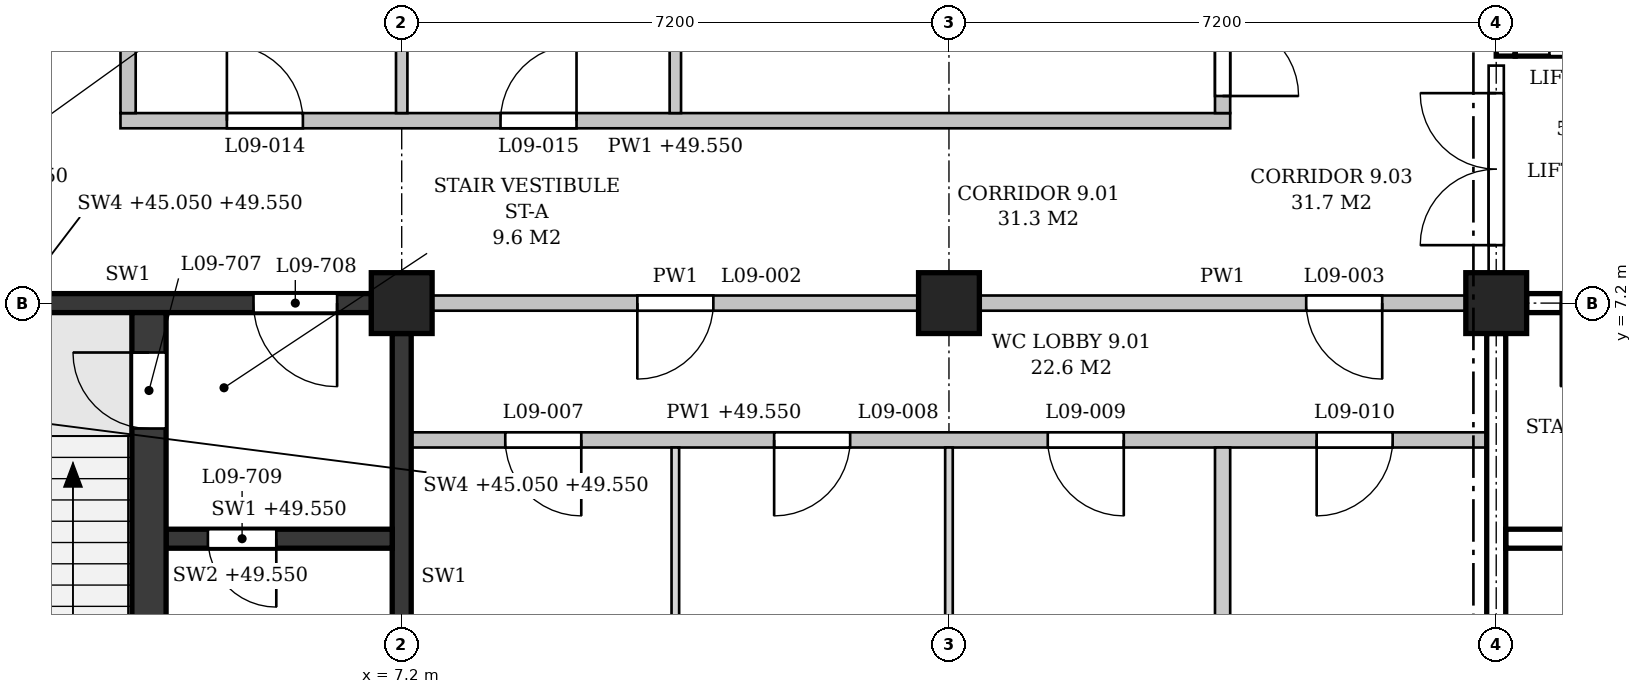
"""IFC4 building model, lengths in metres.
Left out: names, types, materials, properties, quantities, classifications, styles, units other than length and angle.
Written with IfcOpenShell. Run it as: python <this file> out.ifc"""

import sys

from ifc_helpers import new_model, si_unit, direction, frame, frame_2d, origin, origin_2d, place, context, subcontext, project, spatial, polyline, rectangle, outline, extrude, element, fill, save


model = new_model("IFC4")
c1 = context("Model", 3, precision=1e-05, world=origin(), true_north=direction((0.0, 1.0)))
c2 = subcontext(c1, "Body", "Model", "MODEL_VIEW")
j1 = project(units=[si_unit("LENGTHUNIT", "METRE"), si_unit("PLANEANGLEUNIT", "RADIAN")], contexts=[c1])
p1 = place(None, origin())
s1 = spatial("IfcSite", under=j1, at=p1, CompositionType="ELEMENT")
p2 = place(p1, origin())
s2 = spatial("IfcBuilding", under=s1, at=p2, CompositionType="ELEMENT")
p3 = place(p2, frame((0.0, 0.0, 45.3)))
s3 = spatial("IfcBuildingStorey", under=s2, at=p3, CompositionType="ELEMENT", Elevation=45.3)
for number, where, z_axis, x_axis in (
    (1, (7.2, 7.2, 0.0), (0.0, 0.0, 1.0), (1.0, 0.0, 0.0)),
    (2, (14.4, 7.2, 0.0), (0.0, 0.0, 1.0), (1.0, 0.0, 0.0)),
    (3, (21.6, 7.2, 0.0), (0.0, 0.0, 1.0), (1.0, 0.0, 0.0)),
):
    element("IfcColumn", number, at=place(p3, frame(where, z_axis=z_axis, x_axis=x_axis)), inside=s3, PredefinedType="COLUMN", context=c2, shape_type="SweptSolid", body=[
        extrude(rectangle(XDim=0.8, YDim=0.8, at=origin_2d()), origin(), (0.0, 0.0, 1.0), 4.5),
    ])
p4 = place(p3, frame((0.4, 7.2, 0.0), z_axis=(0.0, 0.0, 1.0), x_axis=(1.0, 0.0, 0.0)))
e4 = element("IfcWall", 4, at=p4, inside=s3, PredefinedType="SHEAR", context=c2, shape_type="SweptSolid", body=[
    extrude(rectangle(XDim=6.4, YDim=0.25, at=frame_2d((3.2, 0.0))), origin(), (0.0, 0.0, 1.0), 3.55),
])
p5 = place(p4, frame((4.85, 0.0, 0.0)))
e5 = element("IfcOpeningElement", 5, at=p5, cuts=e4, PredefinedType="OPENING", context=c2, shape_type="SweptSolid", body=[
    extrude(rectangle(XDim=1.1, YDim=2.1, at=frame_2d((0.55, 1.05))), frame((0.0, 0.135, 0.0), z_axis=(0.0, -1.0, 0.0), x_axis=(1.0, 0.0, 0.0)), (0.0, 0.0, 1.0), 0.27),
])
p6 = place(p3, frame((7.2, 0.4, 0.0), z_axis=(0.0, 0.0, 1.0), x_axis=(0.0, 1.0, 0.0)))
e6 = element("IfcWall", 6, at=p6, inside=s3, PredefinedType="SHEAR", context=c2, shape_type="SweptSolid", body=[
    extrude(rectangle(XDim=6.4, YDim=0.25, at=frame_2d((3.2, 0.0))), origin(), (0.0, 0.0, 1.0), 3.55),
])
p7 = place(p3, frame((3.875, 0.15, 0.0), z_axis=(0.0, 0.0, 1.0), x_axis=(0.0, 1.0, 0.0)))
e7 = element("IfcWall", 7, at=p7, inside=s3, PredefinedType="SHEAR", context=c2, shape_type="SweptSolid", body=[
    extrude(rectangle(XDim=6.925, YDim=0.45, at=frame_2d((3.462, 0.0))), origin(), (0.0, 0.0, 1.0), 4.25),
])
p8 = place(p7, frame((5.4, 0.0, 0.0)))
e8 = element("IfcOpeningElement", 8, at=p8, cuts=e7, PredefinedType="OPENING", context=c2, shape_type="SweptSolid", body=[
    extrude(rectangle(XDim=1.0, YDim=2.1, at=frame_2d((0.5, 1.05))), frame((0.0, 0.235, 0.0), z_axis=(0.0, -1.0, 0.0), x_axis=(1.0, 0.0, 0.0)), (0.0, 0.0, 1.0), 0.47),
])
p9 = place(p3, frame((4.1, 4.1, 0.0), z_axis=(0.0, 0.0, 1.0), x_axis=(1.0, 0.0, 0.0)))
e9 = element("IfcWall", 9, at=p9, inside=s3, PredefinedType="SHEAR", context=c2, shape_type="SweptSolid", body=[
    extrude(rectangle(XDim=2.975, YDim=0.25, at=frame_2d((1.487, 0.0))), origin(), (0.0, 0.0, 1.0), 4.25),
])
p10 = place(p9, frame((0.55, 0.0, 0.0)))
e10 = element("IfcOpeningElement", 10, at=p10, cuts=e9, PredefinedType="OPENING", context=c2, shape_type="SweptSolid", body=[
    extrude(rectangle(XDim=0.9, YDim=2.1, at=frame_2d((0.45, 1.05))), frame((0.0, 0.135, 0.0), z_axis=(0.0, -1.0, 0.0), x_axis=(1.0, 0.0, 0.0)), (0.0, 0.0, 1.0), 0.27),
])
p11 = place(p3, frame((22.0, 7.2, 0.0), z_axis=(0.0, 0.0, 1.0), x_axis=(1.0, 0.0, 0.0)))
e11 = element("IfcWall", 11, at=p11, inside=s3, PredefinedType="SHEAR", context=c2, shape_type="SweptSolid", body=[
    extrude(rectangle(XDim=6.4, YDim=0.25, at=frame_2d((3.2, 0.0))), origin(), (0.0, 0.0, 1.0), 3.55),
])
p12 = place(p11, frame((0.45, 0.0, 0.0)))
e12 = element("IfcOpeningElement", 12, at=p12, cuts=e11, PredefinedType="OPENING", context=c2, shape_type="SweptSolid", body=[
    extrude(rectangle(XDim=1.1, YDim=2.1, at=frame_2d((0.55, 1.05))), frame((0.0, 0.135, 0.0), z_axis=(0.0, -1.0, 0.0), x_axis=(1.0, 0.0, 0.0)), (0.0, 0.0, 1.0), 0.27),
])
p13 = place(p3, frame((21.6, 0.4, 0.0), z_axis=(0.0, 0.0, 1.0), x_axis=(0.0, 1.0, 0.0)))
e13 = element("IfcWall", 13, at=p13, inside=s3, PredefinedType="SHEAR", context=c2, shape_type="SweptSolid", body=[
    extrude(rectangle(XDim=6.4, YDim=0.25, at=frame_2d((3.2, 0.0))), origin(), (0.0, 0.0, 1.0), 3.55),
])
p14 = place(p3, frame((21.725, 4.1, 0.0), z_axis=(0.0, 0.0, 1.0), x_axis=(1.0, 0.0, 0.0)))
e14 = element("IfcWall", 14, at=p14, inside=s3, PredefinedType="SHEAR", context=c2, shape_type="SweptSolid", body=[
    extrude(rectangle(XDim=2.975, YDim=0.25, at=frame_2d((1.487, 0.0))), origin(), (0.0, 0.0, 1.0), 4.25),
])
p15 = place(p14, frame((1.525, 0.0, 0.0)))
e15 = element("IfcOpeningElement", 15, at=p15, cuts=e14, PredefinedType="OPENING", context=c2, shape_type="SweptSolid", body=[
    extrude(rectangle(XDim=0.9, YDim=2.1, at=frame_2d((0.45, 1.05))), frame((0.0, 0.135, 0.0), z_axis=(0.0, -1.0, 0.0), x_axis=(1.0, 0.0, 0.0)), (0.0, 0.0, 1.0), 0.27),
])
p16 = place(p3, frame((21.725, 10.45, -0.25), z_axis=(0.0, 0.0, 1.0), x_axis=(0.0, 1.0, 0.0)))
e16 = element("IfcWall", 16, at=p16, inside=s3, PredefinedType="SHEAR", context=c2, shape_type="SweptSolid", body=[
    extrude(rectangle(XDim=3.55, YDim=0.25, at=frame_2d((1.775, 0.0))), origin(), (0.0, 0.0, 1.0), 3.8),
])
p17 = place(p3, frame((21.85, 10.575, -0.25), z_axis=(0.0, 0.0, 1.0), x_axis=(1.0, 0.0, 0.0)))
e17 = element("IfcWall", 17, at=p17, inside=s3, PredefinedType="SHEAR", context=c2, shape_type="SweptSolid", body=[
    extrude(rectangle(XDim=2.0, YDim=0.25, at=frame_2d((1.0, 0.0))), origin(), (0.0, 0.0, 1.0), 4.5),
])
p18 = place(p17, frame((0.45, 0.0, 0.25)))
e18 = element("IfcOpeningElement", 18, at=p18, cuts=e17, PredefinedType="OPENING", context=c2, shape_type="SweptSolid", body=[
    extrude(rectangle(XDim=1.1, YDim=2.1, at=frame_2d((0.55, 1.05))), frame((0.0, 0.135, 0.0), z_axis=(0.0, -1.0, 0.0), x_axis=(1.0, 0.0, 0.0)), (0.0, 0.0, 1.0), 0.27),
])
p19 = place(p3, frame((7.325, 5.4, 0.0), z_axis=(0.0, 0.0, 1.0), x_axis=(1.0, 0.0, 0.0)))
e19 = element("IfcWall", 19, at=p19, inside=s3, PredefinedType="PARTITIONING", context=c2, shape_type="SweptSolid", body=[
    extrude(outline(polyline([(0.0, 0.0), (14.15, 0.0), (14.15, 3.55), (14.05, 3.55), (14.05, 4.25), (7.3, 4.25), (7.3, 3.55), (6.85, 3.55), (6.85, 4.25), (0.1, 4.25), (0.1, 3.55), (0.0, 3.55), (0.0, 0.0)])), frame((0.0, 0.1, 0.0), z_axis=(0.0, -1.0, 0.0), x_axis=(1.0, 0.0, 0.0)), (0.0, 0.0, 1.0), 0.2),
])
p20 = place(p19, frame((1.238, 0.0, 0.0)))
e20 = element("IfcOpeningElement", 20, at=p20, cuts=e19, PredefinedType="OPENING", context=c2, shape_type="SweptSolid", body=[
    extrude(rectangle(XDim=1.0, YDim=2.1, at=frame_2d((0.5, 1.05))), frame((0.0, 0.11, 0.0), z_axis=(0.0, -1.0, 0.0), x_axis=(1.0, 0.0, 0.0)), (0.0, 0.0, 1.0), 0.22),
])
p21 = place(p19, frame((4.775, 0.0, 0.0)))
e21 = element("IfcOpeningElement", 21, at=p21, cuts=e19, PredefinedType="OPENING", context=c2, shape_type="SweptSolid", body=[
    extrude(rectangle(XDim=1.0, YDim=2.1, at=frame_2d((0.5, 1.05))), frame((0.0, 0.11, 0.0), z_axis=(0.0, -1.0, 0.0), x_axis=(1.0, 0.0, 0.0)), (0.0, 0.0, 1.0), 0.22),
])
p22 = place(p19, frame((8.375, 0.0, 0.0)))
e22 = element("IfcOpeningElement", 22, at=p22, cuts=e19, PredefinedType="OPENING", context=c2, shape_type="SweptSolid", body=[
    extrude(rectangle(XDim=1.0, YDim=2.1, at=frame_2d((0.5, 1.05))), frame((0.0, 0.11, 0.0), z_axis=(0.0, -1.0, 0.0), x_axis=(1.0, 0.0, 0.0)), (0.0, 0.0, 1.0), 0.22),
])
p23 = place(p19, frame((11.913, 0.0, 0.0)))
e23 = element("IfcOpeningElement", 23, at=p23, cuts=e19, PredefinedType="OPENING", context=c2, shape_type="SweptSolid", body=[
    extrude(rectangle(XDim=1.0, YDim=2.1, at=frame_2d((0.5, 1.05))), frame((0.0, 0.11, 0.0), z_axis=(0.0, -1.0, 0.0), x_axis=(1.0, 0.0, 0.0)), (0.0, 0.0, 1.0), 0.22),
])
p24 = place(p3, frame((7.6, 7.2, 0.0), z_axis=(0.0, 0.0, 1.0), x_axis=(1.0, 0.0, 0.0)))
e24 = element("IfcWall", 24, at=p24, inside=s3, PredefinedType="PARTITIONING", context=c2, shape_type="SweptSolid", body=[
    extrude(rectangle(XDim=6.4, YDim=0.2, at=frame_2d((3.2, 0.0))), origin(), (0.0, 0.0, 1.0), 3.55),
])
p25 = place(p24, frame((2.7, 0.0, 0.0)))
e25 = element("IfcOpeningElement", 25, at=p25, cuts=e24, PredefinedType="OPENING", context=c2, shape_type="SweptSolid", body=[
    extrude(rectangle(XDim=1.0, YDim=2.1, at=frame_2d((0.5, 1.05))), frame((0.0, 0.11, 0.0), z_axis=(0.0, -1.0, 0.0), x_axis=(1.0, 0.0, 0.0)), (0.0, 0.0, 1.0), 0.22),
])
p26 = place(p3, frame((14.8, 7.2, 0.0), z_axis=(0.0, 0.0, 1.0), x_axis=(1.0, 0.0, 0.0)))
e26 = element("IfcWall", 26, at=p26, inside=s3, PredefinedType="PARTITIONING", context=c2, shape_type="SweptSolid", body=[
    extrude(rectangle(XDim=6.4, YDim=0.2, at=frame_2d((3.2, 0.0))), origin(), (0.0, 0.0, 1.0), 3.55),
])
p27 = place(p26, frame((4.3, 0.0, 0.0)))
e27 = element("IfcOpeningElement", 27, at=p27, cuts=e26, PredefinedType="OPENING", context=c2, shape_type="SweptSolid", body=[
    extrude(rectangle(XDim=1.0, YDim=2.1, at=frame_2d((0.5, 1.05))), frame((0.0, 0.11, 0.0), z_axis=(0.0, -1.0, 0.0), x_axis=(1.0, 0.0, 0.0)), (0.0, 0.0, 1.0), 0.22),
])
p28 = place(p3, frame((3.5, 9.6, 0.0), z_axis=(0.0, 0.0, 1.0), x_axis=(1.0, 0.0, 0.0)))
e28 = element("IfcWall", 28, at=p28, inside=s3, PredefinedType="PARTITIONING", context=c2, shape_type="SweptSolid", body=[
    extrude(outline(polyline([(0.0, 0.0), (14.6, 0.0), (14.6, 4.25), (11.125, 4.25), (11.125, 3.55), (10.675, 3.55), (10.675, 4.25), (3.925, 4.25), (3.925, 3.55), (3.475, 3.55), (3.475, 4.25), (0.0, 4.25), (0.0, 0.0)])), frame((0.0, 0.1, 0.0), z_axis=(0.0, -1.0, 0.0), x_axis=(1.0, 0.0, 0.0)), (0.0, 0.0, 1.0), 0.2),
])
p29 = place(p28, frame((1.4, 0.0, 0.0)))
e29 = element("IfcOpeningElement", 29, at=p29, cuts=e28, PredefinedType="OPENING", context=c2, shape_type="SweptSolid", body=[
    extrude(rectangle(XDim=1.0, YDim=2.1, at=frame_2d((0.5, 1.05))), frame((0.0, 0.11, 0.0), z_axis=(0.0, -1.0, 0.0), x_axis=(1.0, 0.0, 0.0)), (0.0, 0.0, 1.0), 0.22),
])
p30 = place(p28, frame((5.0, 0.0, 0.0)))
e30 = element("IfcOpeningElement", 30, at=p30, cuts=e28, PredefinedType="OPENING", context=c2, shape_type="SweptSolid", body=[
    extrude(rectangle(XDim=1.0, YDim=2.1, at=frame_2d((0.5, 1.05))), frame((0.0, 0.11, 0.0), z_axis=(0.0, -1.0, 0.0), x_axis=(1.0, 0.0, 0.0)), (0.0, 0.0, 1.0), 0.22),
])
p31 = place(p3, frame((3.6, 9.7, 0.0), z_axis=(0.0, 0.0, 1.0), x_axis=(0.0, 1.0, 0.0)))
e31 = element("IfcWall", 31, at=p31, inside=s3, PredefinedType="PARTITIONING", context=c2, shape_type="SweptSolid", body=[
    extrude(rectangle(XDim=1.1, YDim=0.2, at=frame_2d((0.55, 0.0))), origin(), (0.0, 0.0, 1.0), 4.25),
])
p32 = place(p3, frame((7.2, 9.7, 0.0), z_axis=(0.0, 0.0, 1.0), x_axis=(0.0, 1.0, 0.0)))
e32 = element("IfcWall", 32, at=p32, inside=s3, PredefinedType="PARTITIONING", context=c2, shape_type="SweptSolid", body=[
    extrude(rectangle(XDim=4.3, YDim=0.15, at=frame_2d((2.15, 0.0))), origin(), (0.0, 0.0, 1.0), 3.55),
])
p33 = place(p3, frame((10.8, 0.15, 0.0), z_axis=(0.0, 0.0, 1.0), x_axis=(0.0, 1.0, 0.0)))
e33 = element("IfcWall", 33, at=p33, inside=s3, PredefinedType="PARTITIONING", context=c2, shape_type="SweptSolid", body=[
    extrude(rectangle(XDim=5.15, YDim=0.1, at=frame_2d((2.575, 0.0))), origin(), (0.0, 0.0, 1.0), 3.55),
])
p34 = place(p3, frame((10.8, 9.7, 0.0), z_axis=(0.0, 0.0, 1.0), x_axis=(0.0, 1.0, 0.0)))
e34 = element("IfcWall", 34, at=p34, inside=s3, PredefinedType="PARTITIONING", context=c2, shape_type="SweptSolid", body=[
    extrude(rectangle(XDim=11.75, YDim=0.15, at=frame_2d((5.875, 0.0))), origin(), (0.0, 0.0, 1.0), 3.55),
])
p35 = place(p3, frame((14.4, 0.4, 0.0), z_axis=(0.0, 0.0, 1.0), x_axis=(0.0, 1.0, 0.0)))
e35 = element("IfcWall", 35, at=p35, inside=s3, PredefinedType="PARTITIONING", context=c2, shape_type="SweptSolid", body=[
    extrude(rectangle(XDim=4.9, YDim=0.1, at=frame_2d((2.45, 0.0))), origin(), (0.0, 0.0, 1.0), 3.55),
])
p36 = place(p3, frame((18.0, 0.15, 0.0), z_axis=(0.0, 0.0, 1.0), x_axis=(0.0, 1.0, 0.0)))
e36 = element("IfcWall", 36, at=p36, inside=s3, PredefinedType="PARTITIONING", context=c2, shape_type="SweptSolid", body=[
    extrude(outline(polyline([(0.0, 0.0), (5.15, 0.0), (5.15, 4.25), (0.05, 4.25), (0.05, 3.65), (0.0, 3.65), (0.0, 0.0)])), frame((0.0, 0.1, 0.0), z_axis=(0.0, -1.0, 0.0), x_axis=(1.0, 0.0, 0.0)), (0.0, 0.0, 1.0), 0.2),
])
p37 = place(p3, frame((18.0, 9.7, 0.0), z_axis=(0.0, 0.0, 1.0), x_axis=(0.0, 1.0, 0.0)))
e37 = element("IfcWall", 37, at=p37, inside=s3, PredefinedType="PARTITIONING", context=c2, shape_type="SweptSolid", body=[
    extrude(outline(polyline([(0.0, 0.0), (7.1, 0.0), (7.1, 4.25), (4.925, 4.25), (4.925, 3.55), (4.475, 3.55), (4.475, 4.25), (0.0, 4.25), (0.0, 0.0)])), frame((0.0, 0.1, 0.0), z_axis=(0.0, -1.0, 0.0), x_axis=(1.0, 0.0, 0.0)), (0.0, 0.0, 1.0), 0.2),
])
p38 = place(p37, frame((2.55, 0.0, 0.0)))
e38 = element("IfcOpeningElement", 38, at=p38, cuts=e37, PredefinedType="OPENING", context=c2, shape_type="SweptSolid", body=[
    extrude(rectangle(XDim=2.0, YDim=2.1, at=frame_2d((1.0, 1.05))), frame((0.0, 0.11, 0.0), z_axis=(0.0, -1.0, 0.0), x_axis=(1.0, 0.0, 0.0)), (0.0, 0.0, 1.0), 0.22),
])
p39 = place(p37, frame((0.225, 0.0, 0.0)))
e39 = element("IfcOpeningElement", 39, at=p39, cuts=e37, PredefinedType="OPENING", context=c2, shape_type="SweptSolid", body=[
    extrude(rectangle(XDim=2.0, YDim=2.1, at=frame_2d((1.0, 1.05))), frame((0.0, 0.11, 0.0), z_axis=(0.0, -1.0, 0.0), x_axis=(1.0, 0.0, 0.0)), (0.0, 0.0, 1.0), 0.22),
])
p40 = place(p3, frame((21.6, 7.6, 0.0), z_axis=(0.0, 0.0, 1.0), x_axis=(0.0, 1.0, 0.0)))
e40 = element("IfcWall", 40, at=p40, inside=s3, PredefinedType="PARTITIONING", context=c2, shape_type="SweptSolid", body=[
    extrude(rectangle(XDim=2.725, YDim=0.2, at=frame_2d((1.362, 0.0))), origin(), (0.0, 0.0, 1.0), 3.55),
])
p41 = place(p40, frame((0.362, 0.0, 0.0)))
e41 = element("IfcOpeningElement", 41, at=p41, cuts=e40, PredefinedType="OPENING", context=c2, shape_type="SweptSolid", body=[
    extrude(rectangle(XDim=2.0, YDim=2.4, at=frame_2d((1.0, 1.2))), frame((0.0, 0.11, 0.0), z_axis=(0.0, -1.0, 0.0), x_axis=(1.0, 0.0, 0.0)), (0.0, 0.0, 1.0), 0.22),
])
p42 = place(p8, origin())
e42 = element("IfcDoor", 42, at=p42, inside=s3, OperationType="SINGLE_SWING_RIGHT", PredefinedType="DOOR", context=c2, shape_type="SweptSolid", body=[
    extrude(rectangle(XDim=1.0, YDim=2.1, at=frame_2d((0.5, 1.05))), frame((0.0, 0.025, 0.0), z_axis=(0.0, -1.0, 0.0), x_axis=(1.0, 0.0, 0.0)), (0.0, 0.0, 1.0), 0.05),
])
fill(e8, e42)
p43 = place(p5, frame((1.1, 0.0, 0.0), z_axis=(0.0, 0.0, 1.0), x_axis=(-1.0, 0.0, 0.0)))
e43 = element("IfcDoor", 43, at=p43, inside=s3, OperationType="SINGLE_SWING_LEFT", PredefinedType="DOOR", context=c2, shape_type="SweptSolid", body=[
    extrude(rectangle(XDim=1.1, YDim=2.1, at=frame_2d((0.55, 1.05))), frame((0.0, 0.025, 0.0), z_axis=(0.0, -1.0, 0.0), x_axis=(1.0, 0.0, 0.0)), (0.0, 0.0, 1.0), 0.05),
])
fill(e5, e43)
p44 = place(p10, frame((0.9, 0.0, 0.0), z_axis=(0.0, 0.0, 1.0), x_axis=(-1.0, 0.0, 0.0)))
e44 = element("IfcDoor", 44, at=p44, inside=s3, OperationType="SINGLE_SWING_LEFT", PredefinedType="DOOR", context=c2, shape_type="SweptSolid", body=[
    extrude(rectangle(XDim=0.9, YDim=2.1, at=frame_2d((0.45, 1.05))), frame((0.0, 0.025, 0.0), z_axis=(0.0, -1.0, 0.0), x_axis=(1.0, 0.0, 0.0)), (0.0, 0.0, 1.0), 0.05),
])
fill(e10, e44)
p45 = place(p12, frame((1.1, 0.0, 0.0), z_axis=(0.0, 0.0, 1.0), x_axis=(-1.0, 0.0, 0.0)))
e45 = element("IfcDoor", 45, at=p45, inside=s3, OperationType="SINGLE_SWING_RIGHT", PredefinedType="DOOR", context=c2, shape_type="SweptSolid", body=[
    extrude(rectangle(XDim=1.1, YDim=2.1, at=frame_2d((0.55, 1.05))), frame((0.0, 0.025, 0.0), z_axis=(0.0, -1.0, 0.0), x_axis=(1.0, 0.0, 0.0)), (0.0, 0.0, 1.0), 0.05),
])
fill(e12, e45)
p46 = place(p41, origin())
e46 = element("IfcDoor", 46, at=p46, inside=s3, OperationType="DOUBLE_DOOR_SINGLE_SWING", PredefinedType="DOOR", context=c2, shape_type="SweptSolid", body=[
    extrude(rectangle(XDim=2.0, YDim=2.4, at=frame_2d((1.0, 1.2))), frame((0.0, 0.025, 0.0), z_axis=(0.0, -1.0, 0.0), x_axis=(1.0, 0.0, 0.0)), (0.0, 0.0, 1.0), 0.05),
])
fill(e41, e46)
p47 = place(p25, frame((1.0, 0.0, 0.0), z_axis=(0.0, 0.0, 1.0), x_axis=(-1.0, 0.0, 0.0)))
e47 = element("IfcDoor", 47, at=p47, inside=s3, OperationType="SINGLE_SWING_RIGHT", PredefinedType="DOOR", context=c2, shape_type="SweptSolid", body=[
    extrude(rectangle(XDim=1.0, YDim=2.1, at=frame_2d((0.5, 1.05))), frame((0.0, 0.025, 0.0), z_axis=(0.0, -1.0, 0.0), x_axis=(1.0, 0.0, 0.0)), (0.0, 0.0, 1.0), 0.05),
])
fill(e25, e47)
p48 = place(p27, frame((1.0, 0.0, 0.0), z_axis=(0.0, 0.0, 1.0), x_axis=(-1.0, 0.0, 0.0)))
e48 = element("IfcDoor", 48, at=p48, inside=s3, OperationType="SINGLE_SWING_LEFT", PredefinedType="DOOR", context=c2, shape_type="SweptSolid", body=[
    extrude(rectangle(XDim=1.0, YDim=2.1, at=frame_2d((0.5, 1.05))), frame((0.0, 0.025, 0.0), z_axis=(0.0, -1.0, 0.0), x_axis=(1.0, 0.0, 0.0)), (0.0, 0.0, 1.0), 0.05),
])
fill(e27, e48)
p49 = place(p20, frame((1.0, 0.0, 0.0), z_axis=(0.0, 0.0, 1.0), x_axis=(-1.0, 0.0, 0.0)))
e49 = element("IfcDoor", 49, at=p49, inside=s3, OperationType="SINGLE_SWING_LEFT", PredefinedType="DOOR", context=c2, shape_type="SweptSolid", body=[
    extrude(rectangle(XDim=1.0, YDim=2.1, at=frame_2d((0.5, 1.05))), frame((0.0, 0.025, 0.0), z_axis=(0.0, -1.0, 0.0), x_axis=(1.0, 0.0, 0.0)), (0.0, 0.0, 1.0), 0.05),
])
fill(e20, e49)
p50 = place(p21, frame((1.0, 0.0, 0.0), z_axis=(0.0, 0.0, 1.0), x_axis=(-1.0, 0.0, 0.0)))
e50 = element("IfcDoor", 50, at=p50, inside=s3, OperationType="SINGLE_SWING_RIGHT", PredefinedType="DOOR", context=c2, shape_type="SweptSolid", body=[
    extrude(rectangle(XDim=1.0, YDim=2.1, at=frame_2d((0.5, 1.05))), frame((0.0, 0.025, 0.0), z_axis=(0.0, -1.0, 0.0), x_axis=(1.0, 0.0, 0.0)), (0.0, 0.0, 1.0), 0.05),
])
fill(e21, e50)
p51 = place(p22, frame((1.0, 0.0, 0.0), z_axis=(0.0, 0.0, 1.0), x_axis=(-1.0, 0.0, 0.0)))
e51 = element("IfcDoor", 51, at=p51, inside=s3, OperationType="SINGLE_SWING_LEFT", PredefinedType="DOOR", context=c2, shape_type="SweptSolid", body=[
    extrude(rectangle(XDim=1.0, YDim=2.1, at=frame_2d((0.5, 1.05))), frame((0.0, 0.025, 0.0), z_axis=(0.0, -1.0, 0.0), x_axis=(1.0, 0.0, 0.0)), (0.0, 0.0, 1.0), 0.05),
])
fill(e22, e51)
p52 = place(p23, frame((1.0, 0.0, 0.0), z_axis=(0.0, 0.0, 1.0), x_axis=(-1.0, 0.0, 0.0)))
e52 = element("IfcDoor", 52, at=p52, inside=s3, OperationType="SINGLE_SWING_RIGHT", PredefinedType="DOOR", context=c2, shape_type="SweptSolid", body=[
    extrude(rectangle(XDim=1.0, YDim=2.1, at=frame_2d((0.5, 1.05))), frame((0.0, 0.025, 0.0), z_axis=(0.0, -1.0, 0.0), x_axis=(1.0, 0.0, 0.0)), (0.0, 0.0, 1.0), 0.05),
])
fill(e23, e52)
p53 = place(p29, origin())
e53 = element("IfcDoor", 53, at=p53, inside=s3, OperationType="SINGLE_SWING_LEFT", PredefinedType="DOOR", context=c2, shape_type="SweptSolid", body=[
    extrude(rectangle(XDim=1.0, YDim=2.1, at=frame_2d((0.5, 1.05))), frame((0.0, 0.025, 0.0), z_axis=(0.0, -1.0, 0.0), x_axis=(1.0, 0.0, 0.0)), (0.0, 0.0, 1.0), 0.05),
])
fill(e29, e53)
p54 = place(p30, origin())
e54 = element("IfcDoor", 54, at=p54, inside=s3, OperationType="SINGLE_SWING_RIGHT", PredefinedType="DOOR", context=c2, shape_type="SweptSolid", body=[
    extrude(rectangle(XDim=1.0, YDim=2.1, at=frame_2d((0.5, 1.05))), frame((0.0, 0.025, 0.0), z_axis=(0.0, -1.0, 0.0), x_axis=(1.0, 0.0, 0.0)), (0.0, 0.0, 1.0), 0.05),
])
fill(e30, e54)
p55 = place(p39, origin())
e55 = element("IfcDoor", 55, at=p55, inside=s3, OperationType="DOUBLE_DOOR_SINGLE_SWING", PredefinedType="DOOR", context=c2, shape_type="SweptSolid", body=[
    extrude(rectangle(XDim=2.0, YDim=2.1, at=frame_2d((1.0, 1.05))), frame((0.0, 0.025, 0.0), z_axis=(0.0, -1.0, 0.0), x_axis=(1.0, 0.0, 0.0)), (0.0, 0.0, 1.0), 0.05),
])
fill(e39, e55)
save(model, sys.argv[1])
